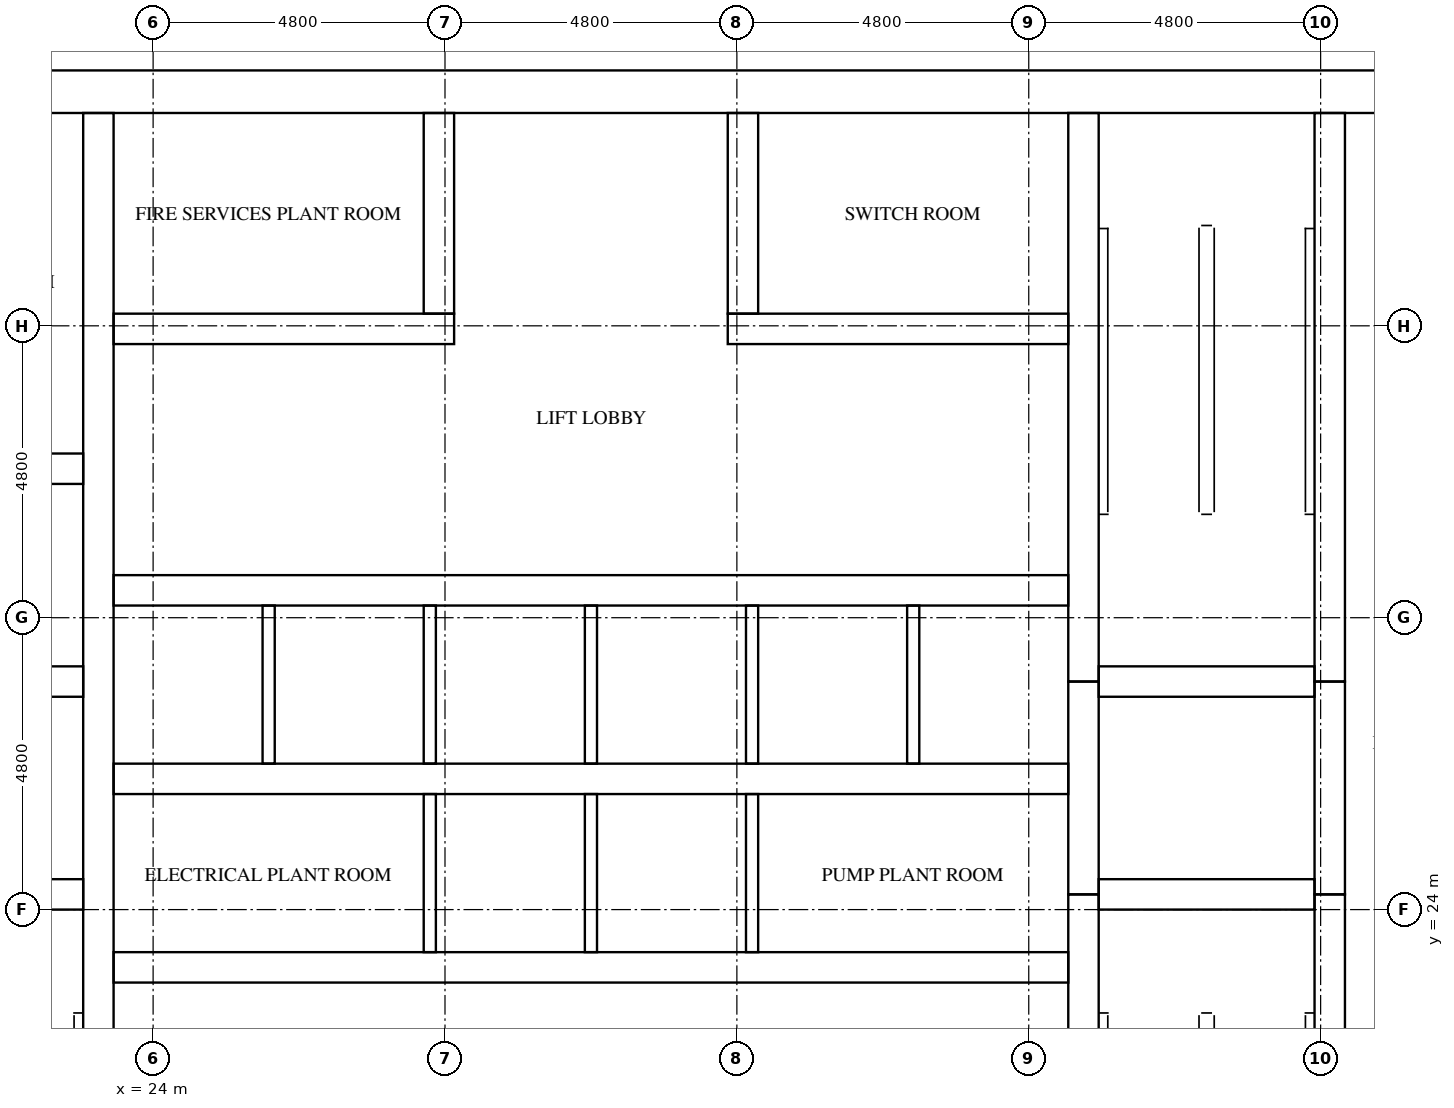
"""IFC4 building model, lengths in metres.
Left out: names, types, materials, properties, quantities, classifications, styles, units other than length and angle.
Written with IfcOpenShell. Run it as: python <this file> out.ifc"""

import sys

from ifc_helpers import new_model, si_unit, direction, frame, frame_2d, origin, place, context, subcontext, project, spatial, rectangle, extrude, element, fill, save


model = new_model("IFC4")
c1 = context("Model", 3, precision=1e-05, world=origin(), true_north=direction((0.0, 1.0)))
c2 = subcontext(c1, "Body", "Model", "MODEL_VIEW")
j1 = project(units=[si_unit("LENGTHUNIT", "METRE"), si_unit("PLANEANGLEUNIT", "RADIAN")], contexts=[c1])
p1 = place(None, origin())
s1 = spatial("IfcSite", under=j1, at=p1, CompositionType="ELEMENT")
p2 = place(p1, origin())
s2 = spatial("IfcBuilding", under=s1, at=p2, CompositionType="ELEMENT")
p3 = place(p2, frame((0.0, 0.0, 173.5)))
s3 = spatial("IfcBuildingStorey", under=s2, at=p3, CompositionType="ELEMENT", Elevation=173.5)
p4 = place(p3, frame((15.0, 37.45, 0.0), z_axis=(0.0, 0.0, 1.0), x_axis=(1.0, 0.0, 0.0)))
e1 = element("IfcWall", 1, at=p4, inside=s3, PredefinedType="SHEAR", context=c2, shape_type="SweptSolid", body=[
    extrude(rectangle(XDim=32.4, YDim=0.7, at=frame_2d((16.2, 0.0))), origin(), (0.0, 0.0, 1.0), 5.1),
])
p5 = place(p4, frame((15.3, 0.0, 0.0)))
e2 = element("IfcOpeningElement", 2, at=p5, cuts=e1, PredefinedType="OPENING", context=c2, shape_type="SweptSolid", body=[
    extrude(rectangle(XDim=1.8, YDim=2.1, at=frame_2d((0.9, 1.05))), frame((0.0, 0.36, 0.0), z_axis=(0.0, -1.0, 0.0), x_axis=(1.0, 0.0, 0.0)), (0.0, 0.0, 1.0), 0.72),
])
p6 = place(p4, frame((1.544, 0.0, 0.0)))
e3 = element("IfcOpeningElement", 3, at=p6, cuts=e1, PredefinedType="OPENING", context=c2, shape_type="SweptSolid", body=[
    extrude(rectangle(XDim=1.0, YDim=2.1, at=frame_2d((0.5, 1.05))), frame((0.0, 0.36, 0.0), z_axis=(0.0, -1.0, 0.0), x_axis=(1.0, 0.0, 0.0)), (0.0, 0.0, 1.0), 0.72),
])
p7 = place(p4, frame((5.219, 0.0, 0.0)))
e4 = element("IfcOpeningElement", 4, at=p7, cuts=e1, PredefinedType="OPENING", context=c2, shape_type="SweptSolid", body=[
    extrude(rectangle(XDim=1.0, YDim=2.1, at=frame_2d((0.5, 1.05))), frame((0.0, 0.36, 0.0), z_axis=(0.0, -1.0, 0.0), x_axis=(1.0, 0.0, 0.0)), (0.0, 0.0, 1.0), 0.72),
])
p8 = place(p3, frame((23.1, 15.7, 0.0), z_axis=(0.0, 0.0, 1.0), x_axis=(0.0, 1.0, 0.0)))
e5 = element("IfcWall", 5, at=p8, inside=s3, PredefinedType="SHEAR", context=c2, shape_type="SweptSolid", body=[
    extrude(rectangle(XDim=21.4, YDim=0.5, at=frame_2d((10.7, 0.0))), origin(), (0.0, 0.0, 1.0), 5.1),
])
p9 = place(p3, frame((39.3, 15.7, 0.0), z_axis=(0.0, 0.0, 1.0), x_axis=(0.0, 1.0, 0.0)))
e6 = element("IfcWall", 6, at=p9, inside=s3, PredefinedType="SHEAR", context=c2, shape_type="SweptSolid", body=[
    extrude(rectangle(XDim=8.55, YDim=0.5, at=frame_2d((4.275, 0.0))), origin(), (0.0, 0.0, 1.0), 5.1),
])
p10 = place(p3, frame((39.3, 24.25, 0.0), z_axis=(0.0, 0.0, 1.0), x_axis=(0.0, 1.0, 0.0)))
e7 = element("IfcWall", 7, at=p10, inside=s3, PredefinedType="SHEAR", context=c2, shape_type="SweptSolid", body=[
    extrude(rectangle(XDim=3.5, YDim=0.5, at=frame_2d((1.75, 0.0))), origin(), (0.0, 0.0, 1.0), 5.1),
])
p11 = place(p3, frame((39.3, 27.75, 0.0), z_axis=(0.0, 0.0, 1.0), x_axis=(0.0, 1.0, 0.0)))
e8 = element("IfcWall", 8, at=p11, inside=s3, PredefinedType="SHEAR", context=c2, shape_type="SweptSolid", body=[
    extrude(rectangle(XDim=9.35, YDim=0.5, at=frame_2d((4.675, 0.0))), origin(), (0.0, 0.0, 1.0), 5.1),
])
p12 = place(p3, frame((43.35, 15.7, 0.0), z_axis=(0.0, 0.0, 1.0), x_axis=(0.0, 1.0, 0.0)))
e9 = element("IfcWall", 9, at=p12, inside=s3, PredefinedType="SHEAR", context=c2, shape_type="SweptSolid", body=[
    extrude(rectangle(XDim=8.55, YDim=0.5, at=frame_2d((4.275, 0.0))), origin(), (0.0, 0.0, 1.0), 5.1),
])
p13 = place(p12, frame((0.5, 0.0, 0.0)))
e10 = element("IfcOpeningElement", 10, at=p13, cuts=e9, PredefinedType="OPENING", context=c2, shape_type="SweptSolid", body=[
    extrude(rectangle(XDim=1.2, YDim=2.1, at=frame_2d((0.6, 1.05))), frame((0.0, 0.26, 0.0), z_axis=(0.0, -1.0, 0.0), x_axis=(1.0, 0.0, 0.0)), (0.0, 0.0, 1.0), 0.52),
])
p14 = place(p3, frame((43.35, 24.25, 0.0), z_axis=(0.0, 0.0, 1.0), x_axis=(0.0, 1.0, 0.0)))
e11 = element("IfcWall", 11, at=p14, inside=s3, PredefinedType="SHEAR", context=c2, shape_type="SweptSolid", body=[
    extrude(rectangle(XDim=3.5, YDim=0.5, at=frame_2d((1.75, 0.0))), origin(), (0.0, 0.0, 1.0), 5.1),
])
p15 = place(p14, frame((1.2, 0.0, 0.0)))
e12 = element("IfcOpeningElement", 12, at=p15, cuts=e11, PredefinedType="OPENING", context=c2, shape_type="SweptSolid", body=[
    extrude(rectangle(XDim=1.1, YDim=2.1, at=frame_2d((0.55, 1.05))), frame((0.0, 0.26, 0.0), z_axis=(0.0, -1.0, 0.0), x_axis=(1.0, 0.0, 0.0)), (0.0, 0.0, 1.0), 0.52),
])
p16 = place(p3, frame((43.35, 27.75, 0.0), z_axis=(0.0, 0.0, 1.0), x_axis=(0.0, 1.0, 0.0)))
e13 = element("IfcWall", 13, at=p16, inside=s3, PredefinedType="SHEAR", context=c2, shape_type="SweptSolid", body=[
    extrude(rectangle(XDim=9.35, YDim=0.5, at=frame_2d((4.675, 0.0))), origin(), (0.0, 0.0, 1.0), 5.1),
])
p17 = place(p16, frame((7.65, 0.0, 0.0)))
e14 = element("IfcOpeningElement", 14, at=p17, cuts=e13, PredefinedType="OPENING", context=c2, shape_type="SweptSolid", body=[
    extrude(rectangle(XDim=1.2, YDim=2.1, at=frame_2d((0.6, 1.05))), frame((0.0, 0.26, 0.0), z_axis=(0.0, -1.0, 0.0), x_axis=(1.0, 0.0, 0.0)), (0.0, 0.0, 1.0), 0.52),
])
for number, where, z_axis, x_axis in (
    (15, (19.3, 24.25, 0.0), (0.0, 0.0, 1.0), (1.0, 0.0, 0.0)),
    (16, (19.3, 27.75, 0.0), (0.0, 0.0, 1.0), (1.0, 0.0, 0.0)),
):
    element("IfcWall", number, at=place(p3, frame(where, z_axis=z_axis, x_axis=x_axis)), inside=s3, PredefinedType="SHEAR", context=c2, shape_type="SweptSolid", body=[
        extrude(rectangle(XDim=3.55, YDim=0.5, at=frame_2d((1.775, 0.0))), origin(), (0.0, 0.0, 1.0), 5.1),
    ])
p18 = place(p3, frame((15.7, 31.25, 0.0), z_axis=(0.0, 0.0, 1.0), x_axis=(1.0, 0.0, 0.0)))
e17 = element("IfcWall", 17, at=p18, inside=s3, PredefinedType="SHEAR", context=c2, shape_type="SweptSolid", body=[
    extrude(rectangle(XDim=7.15, YDim=0.5, at=frame_2d((3.575, 0.0))), origin(), (0.0, 0.0, 1.0), 5.1),
])
for number, where, z_axis, x_axis in (
    (18, (39.55, 24.25, 0.0), (0.0, 0.0, 1.0), (1.0, 0.0, 0.0)),
    (19, (39.55, 27.75, 0.0), (0.0, 0.0, 1.0), (1.0, 0.0, 0.0)),
):
    element("IfcWall", number, at=place(p3, frame(where, z_axis=z_axis, x_axis=x_axis)), inside=s3, PredefinedType="SHEAR", context=c2, shape_type="SweptSolid", body=[
        extrude(rectangle(XDim=3.55, YDim=0.5, at=frame_2d((1.775, 0.0))), origin(), (0.0, 0.0, 1.0), 5.1),
    ])
p19 = place(p3, frame((23.35, 23.05, 0.0), z_axis=(0.0, 0.0, 1.0), x_axis=(1.0, 0.0, 0.0)))
e20 = element("IfcWall", 20, at=p19, inside=s3, PredefinedType="SHEAR", context=c2, shape_type="SweptSolid", body=[
    extrude(rectangle(XDim=15.7, YDim=0.5, at=frame_2d((7.85, 0.0))), origin(), (0.0, 0.0, 1.0), 5.1),
])
p20 = place(p19, frame((2.05, 0.0, 0.0)))
e21 = element("IfcOpeningElement", 21, at=p20, cuts=e20, PredefinedType="OPENING", context=c2, shape_type="SweptSolid", body=[
    extrude(rectangle(XDim=1.0, YDim=2.1, at=frame_2d((0.5, 1.05))), frame((0.0, 0.26, 0.0), z_axis=(0.0, -1.0, 0.0), x_axis=(1.0, 0.0, 0.0)), (0.0, 0.0, 1.0), 0.52),
])
p21 = place(p19, frame((12.65, 0.0, 0.0)))
e22 = element("IfcOpeningElement", 22, at=p21, cuts=e20, PredefinedType="OPENING", context=c2, shape_type="SweptSolid", body=[
    extrude(rectangle(XDim=1.0, YDim=2.1, at=frame_2d((0.5, 1.05))), frame((0.0, 0.26, 0.0), z_axis=(0.0, -1.0, 0.0), x_axis=(1.0, 0.0, 0.0)), (0.0, 0.0, 1.0), 0.52),
])
p22 = place(p3, frame((23.35, 26.15, 0.0), z_axis=(0.0, 0.0, 1.0), x_axis=(1.0, 0.0, 0.0)))
e23 = element("IfcWall", 23, at=p22, inside=s3, PredefinedType="SHEAR", context=c2, shape_type="SweptSolid", body=[
    extrude(rectangle(XDim=15.7, YDim=0.5, at=frame_2d((7.85, 0.0))), origin(), (0.0, 0.0, 1.0), 5.1),
])
p23 = place(p3, frame((23.35, 29.25, 0.0), z_axis=(0.0, 0.0, 1.0), x_axis=(1.0, 0.0, 0.0)))
e24 = element("IfcWall", 24, at=p23, inside=s3, PredefinedType="SHEAR", context=c2, shape_type="SweptSolid", body=[
    extrude(rectangle(XDim=15.7, YDim=0.5, at=frame_2d((7.85, 0.0))), origin(), (0.0, 0.0, 1.0), 5.1),
])
p24 = place(p23, frame((0.675, 0.0, 0.0)))
e25 = element("IfcOpeningElement", 25, at=p24, cuts=e24, PredefinedType="OPENING", context=c2, shape_type="SweptSolid", body=[
    extrude(rectangle(XDim=1.1, YDim=2.1, at=frame_2d((0.55, 1.05))), frame((0.0, 0.26, 0.0), z_axis=(0.0, -1.0, 0.0), x_axis=(1.0, 0.0, 0.0)), (0.0, 0.0, 1.0), 0.52),
])
p25 = place(p23, frame((3.325, 0.0, 0.0)))
e26 = element("IfcOpeningElement", 26, at=p25, cuts=e24, PredefinedType="OPENING", context=c2, shape_type="SweptSolid", body=[
    extrude(rectangle(XDim=1.1, YDim=2.1, at=frame_2d((0.55, 1.05))), frame((0.0, 0.26, 0.0), z_axis=(0.0, -1.0, 0.0), x_axis=(1.0, 0.0, 0.0)), (0.0, 0.0, 1.0), 0.52),
])
p26 = place(p23, frame((5.975, 0.0, 0.0)))
e27 = element("IfcOpeningElement", 27, at=p26, cuts=e24, PredefinedType="OPENING", context=c2, shape_type="SweptSolid", body=[
    extrude(rectangle(XDim=1.1, YDim=2.1, at=frame_2d((0.55, 1.05))), frame((0.0, 0.26, 0.0), z_axis=(0.0, -1.0, 0.0), x_axis=(1.0, 0.0, 0.0)), (0.0, 0.0, 1.0), 0.52),
])
p27 = place(p23, frame((8.625, 0.0, 0.0)))
e28 = element("IfcOpeningElement", 28, at=p27, cuts=e24, PredefinedType="OPENING", context=c2, shape_type="SweptSolid", body=[
    extrude(rectangle(XDim=1.1, YDim=2.1, at=frame_2d((0.55, 1.05))), frame((0.0, 0.26, 0.0), z_axis=(0.0, -1.0, 0.0), x_axis=(1.0, 0.0, 0.0)), (0.0, 0.0, 1.0), 0.52),
])
p28 = place(p23, frame((11.275, 0.0, 0.0)))
e29 = element("IfcOpeningElement", 29, at=p28, cuts=e24, PredefinedType="OPENING", context=c2, shape_type="SweptSolid", body=[
    extrude(rectangle(XDim=1.1, YDim=2.1, at=frame_2d((0.55, 1.05))), frame((0.0, 0.26, 0.0), z_axis=(0.0, -1.0, 0.0), x_axis=(1.0, 0.0, 0.0)), (0.0, 0.0, 1.0), 0.52),
])
p29 = place(p23, frame((13.925, 0.0, 0.0)))
e30 = element("IfcOpeningElement", 30, at=p29, cuts=e24, PredefinedType="OPENING", context=c2, shape_type="SweptSolid", body=[
    extrude(rectangle(XDim=1.1, YDim=2.1, at=frame_2d((0.55, 1.05))), frame((0.0, 0.26, 0.0), z_axis=(0.0, -1.0, 0.0), x_axis=(1.0, 0.0, 0.0)), (0.0, 0.0, 1.0), 0.52),
])
p30 = place(p3, frame((23.35, 33.55, 0.0), z_axis=(0.0, 0.0, 1.0), x_axis=(1.0, 0.0, 0.0)))
e31 = element("IfcWall", 31, at=p30, inside=s3, PredefinedType="SHEAR", context=c2, shape_type="SweptSolid", body=[
    extrude(rectangle(XDim=5.6, YDim=0.5, at=frame_2d((2.8, 0.0))), origin(), (0.0, 0.0, 1.0), 5.1),
])
p31 = place(p30, frame((2.05, 0.0, 0.0)))
e32 = element("IfcOpeningElement", 32, at=p31, cuts=e31, PredefinedType="OPENING", context=c2, shape_type="SweptSolid", body=[
    extrude(rectangle(XDim=1.0, YDim=2.1, at=frame_2d((0.5, 1.05))), frame((0.0, 0.26, 0.0), z_axis=(0.0, -1.0, 0.0), x_axis=(1.0, 0.0, 0.0)), (0.0, 0.0, 1.0), 0.52),
])
p32 = place(p3, frame((33.45, 33.55, 0.0), z_axis=(0.0, 0.0, 1.0), x_axis=(1.0, 0.0, 0.0)))
e33 = element("IfcWall", 33, at=p32, inside=s3, PredefinedType="SHEAR", context=c2, shape_type="SweptSolid", body=[
    extrude(rectangle(XDim=5.6, YDim=0.5, at=frame_2d((2.8, 0.0))), origin(), (0.0, 0.0, 1.0), 5.1),
])
p33 = place(p32, frame((2.55, 0.0, 0.0)))
e34 = element("IfcOpeningElement", 34, at=p33, cuts=e33, PredefinedType="OPENING", context=c2, shape_type="SweptSolid", body=[
    extrude(rectangle(XDim=1.0, YDim=2.1, at=frame_2d((0.5, 1.05))), frame((0.0, 0.26, 0.0), z_axis=(0.0, -1.0, 0.0), x_axis=(1.0, 0.0, 0.0)), (0.0, 0.0, 1.0), 0.52),
])
for number, where, z_axis, x_axis in (
    (35, (28.7, 33.8, 0.0), (0.0, 0.0, 1.0), (0.0, 1.0, 0.0)),
    (36, (33.7, 33.8, 0.0), (0.0, 0.0, 1.0), (0.0, 1.0, 0.0)),
):
    element("IfcWall", number, at=place(p3, frame(where, z_axis=z_axis, x_axis=x_axis)), inside=s3, PredefinedType="SHEAR", context=c2, shape_type="SweptSolid", body=[
        extrude(rectangle(XDim=3.3, YDim=0.5, at=frame_2d((1.65, 0.0))), origin(), (0.0, 0.0, 1.0), 5.1),
    ])
p34 = place(p3, frame((25.9, 26.4, 0.0), z_axis=(0.0, 0.0, 1.0), x_axis=(0.0, 1.0, 0.0)))
e37 = element("IfcWall", 37, at=p34, inside=s3, PredefinedType="SOLIDWALL", context=c2, shape_type="SweptSolid", body=[
    extrude(rectangle(XDim=2.6, YDim=0.2, at=frame_2d((1.3, 0.0))), origin(), (0.0, 0.0, 1.0), 5.1),
])
p35 = place(p3, frame((28.55, 23.3, 0.0), z_axis=(0.0, 0.0, 1.0), x_axis=(0.0, 1.0, 0.0)))
e38 = element("IfcWall", 38, at=p35, inside=s3, PredefinedType="SOLIDWALL", context=c2, shape_type="SweptSolid", body=[
    extrude(rectangle(XDim=2.6, YDim=0.2, at=frame_2d((1.3, 0.0))), origin(), (0.0, 0.0, 1.0), 5.1),
])
p36 = place(p3, frame((28.55, 26.4, 0.0), z_axis=(0.0, 0.0, 1.0), x_axis=(0.0, 1.0, 0.0)))
e39 = element("IfcWall", 39, at=p36, inside=s3, PredefinedType="SOLIDWALL", context=c2, shape_type="SweptSolid", body=[
    extrude(rectangle(XDim=2.6, YDim=0.2, at=frame_2d((1.3, 0.0))), origin(), (0.0, 0.0, 1.0), 5.1),
])
p37 = place(p3, frame((31.2, 23.3, 0.0), z_axis=(0.0, 0.0, 1.0), x_axis=(0.0, 1.0, 0.0)))
e40 = element("IfcWall", 40, at=p37, inside=s3, PredefinedType="SOLIDWALL", context=c2, shape_type="SweptSolid", body=[
    extrude(rectangle(XDim=2.6, YDim=0.2, at=frame_2d((1.3, 0.0))), origin(), (0.0, 0.0, 1.0), 5.1),
])
p38 = place(p3, frame((31.2, 26.4, 0.0), z_axis=(0.0, 0.0, 1.0), x_axis=(0.0, 1.0, 0.0)))
e41 = element("IfcWall", 41, at=p38, inside=s3, PredefinedType="SOLIDWALL", context=c2, shape_type="SweptSolid", body=[
    extrude(rectangle(XDim=2.6, YDim=0.2, at=frame_2d((1.3, 0.0))), origin(), (0.0, 0.0, 1.0), 5.1),
])
p39 = place(p3, frame((33.85, 23.3, 0.0), z_axis=(0.0, 0.0, 1.0), x_axis=(0.0, 1.0, 0.0)))
e42 = element("IfcWall", 42, at=p39, inside=s3, PredefinedType="SOLIDWALL", context=c2, shape_type="SweptSolid", body=[
    extrude(rectangle(XDim=2.6, YDim=0.2, at=frame_2d((1.3, 0.0))), origin(), (0.0, 0.0, 1.0), 5.1),
])
for number, where, z_axis, x_axis in (
    (43, (33.85, 26.4, 0.0), (0.0, 0.0, 1.0), (0.0, 1.0, 0.0)),
    (44, (36.5, 26.4, 0.0), (0.0, 0.0, 1.0), (0.0, 1.0, 0.0)),
):
    element("IfcWall", number, at=place(p3, frame(where, z_axis=z_axis, x_axis=x_axis)), inside=s3, PredefinedType="SOLIDWALL", context=c2, shape_type="SweptSolid", body=[
        extrude(rectangle(XDim=2.6, YDim=0.2, at=frame_2d((1.3, 0.0))), origin(), (0.0, 0.0, 1.0), 5.1),
    ])
p40 = place(p24, origin())
e45 = element("IfcDoor", 45, at=p40, inside=s3, OperationType="DOUBLE_DOOR_SLIDING", PredefinedType="DOOR", context=c2, shape_type="SweptSolid", body=[
    extrude(rectangle(XDim=1.1, YDim=2.1, at=frame_2d((0.55, 1.05))), frame((0.0, 0.025, 0.0), z_axis=(0.0, -1.0, 0.0), x_axis=(1.0, 0.0, 0.0)), (0.0, 0.0, 1.0), 0.05),
])
fill(e25, e45)
p41 = place(p25, origin())
e46 = element("IfcDoor", 46, at=p41, inside=s3, OperationType="DOUBLE_DOOR_SLIDING", PredefinedType="DOOR", context=c2, shape_type="SweptSolid", body=[
    extrude(rectangle(XDim=1.1, YDim=2.1, at=frame_2d((0.55, 1.05))), frame((0.0, 0.025, 0.0), z_axis=(0.0, -1.0, 0.0), x_axis=(1.0, 0.0, 0.0)), (0.0, 0.0, 1.0), 0.05),
])
fill(e26, e46)
p42 = place(p26, origin())
e47 = element("IfcDoor", 47, at=p42, inside=s3, OperationType="DOUBLE_DOOR_SLIDING", PredefinedType="DOOR", context=c2, shape_type="SweptSolid", body=[
    extrude(rectangle(XDim=1.1, YDim=2.1, at=frame_2d((0.55, 1.05))), frame((0.0, 0.025, 0.0), z_axis=(0.0, -1.0, 0.0), x_axis=(1.0, 0.0, 0.0)), (0.0, 0.0, 1.0), 0.05),
])
fill(e27, e47)
p43 = place(p27, origin())
e48 = element("IfcDoor", 48, at=p43, inside=s3, OperationType="DOUBLE_DOOR_SLIDING", PredefinedType="DOOR", context=c2, shape_type="SweptSolid", body=[
    extrude(rectangle(XDim=1.1, YDim=2.1, at=frame_2d((0.55, 1.05))), frame((0.0, 0.025, 0.0), z_axis=(0.0, -1.0, 0.0), x_axis=(1.0, 0.0, 0.0)), (0.0, 0.0, 1.0), 0.05),
])
fill(e28, e48)
p44 = place(p28, origin())
e49 = element("IfcDoor", 49, at=p44, inside=s3, OperationType="DOUBLE_DOOR_SLIDING", PredefinedType="DOOR", context=c2, shape_type="SweptSolid", body=[
    extrude(rectangle(XDim=1.1, YDim=2.1, at=frame_2d((0.55, 1.05))), frame((0.0, 0.025, 0.0), z_axis=(0.0, -1.0, 0.0), x_axis=(1.0, 0.0, 0.0)), (0.0, 0.0, 1.0), 0.05),
])
fill(e29, e49)
p45 = place(p29, origin())
e50 = element("IfcDoor", 50, at=p45, inside=s3, OperationType="DOUBLE_DOOR_SLIDING", PredefinedType="DOOR", context=c2, shape_type="SweptSolid", body=[
    extrude(rectangle(XDim=1.1, YDim=2.1, at=frame_2d((0.55, 1.05))), frame((0.0, 0.025, 0.0), z_axis=(0.0, -1.0, 0.0), x_axis=(1.0, 0.0, 0.0)), (0.0, 0.0, 1.0), 0.05),
])
fill(e30, e50)
p46 = place(p15, origin())
e51 = element("IfcDoor", 51, at=p46, inside=s3, OperationType="DOUBLE_DOOR_SLIDING", PredefinedType="DOOR", context=c2, shape_type="SweptSolid", body=[
    extrude(rectangle(XDim=1.1, YDim=2.1, at=frame_2d((0.55, 1.05))), frame((0.0, 0.025, 0.0), z_axis=(0.0, -1.0, 0.0), x_axis=(1.0, 0.0, 0.0)), (0.0, 0.0, 1.0), 0.05),
])
fill(e12, e51)
p47 = place(p17, origin())
e52 = element("IfcDoor", 52, at=p47, inside=s3, OperationType="SINGLE_SWING_LEFT", PredefinedType="DOOR", context=c2, shape_type="SweptSolid", body=[
    extrude(rectangle(XDim=1.2, YDim=2.1, at=frame_2d((0.6, 1.05))), frame((0.0, 0.025, 0.0), z_axis=(0.0, -1.0, 0.0), x_axis=(1.0, 0.0, 0.0)), (0.0, 0.0, 1.0), 0.05),
])
fill(e14, e52)
p48 = place(p5, origin())
e53 = element("IfcDoor", 53, at=p48, inside=s3, OperationType="DOUBLE_DOOR_SINGLE_SWING", PredefinedType="DOOR", context=c2, shape_type="SweptSolid", body=[
    extrude(rectangle(XDim=1.8, YDim=2.1, at=frame_2d((0.9, 1.05))), frame((0.0, 0.025, 0.0), z_axis=(0.0, -1.0, 0.0), x_axis=(1.0, 0.0, 0.0)), (0.0, 0.0, 1.0), 0.05),
])
fill(e2, e53)
p49 = place(p20, frame((1.0, 0.0, 0.0), z_axis=(0.0, 0.0, 1.0), x_axis=(-1.0, 0.0, 0.0)))
e54 = element("IfcDoor", 54, at=p49, inside=s3, OperationType="SINGLE_SWING_RIGHT", PredefinedType="DOOR", context=c2, shape_type="SweptSolid", body=[
    extrude(rectangle(XDim=1.0, YDim=2.1, at=frame_2d((0.5, 1.05))), frame((0.0, 0.025, 0.0), z_axis=(0.0, -1.0, 0.0), x_axis=(1.0, 0.0, 0.0)), (0.0, 0.0, 1.0), 0.05),
])
fill(e21, e54)
p50 = place(p21, frame((1.0, 0.0, 0.0), z_axis=(0.0, 0.0, 1.0), x_axis=(-1.0, 0.0, 0.0)))
e55 = element("IfcDoor", 55, at=p50, inside=s3, OperationType="SINGLE_SWING_LEFT", PredefinedType="DOOR", context=c2, shape_type="SweptSolid", body=[
    extrude(rectangle(XDim=1.0, YDim=2.1, at=frame_2d((0.5, 1.05))), frame((0.0, 0.025, 0.0), z_axis=(0.0, -1.0, 0.0), x_axis=(1.0, 0.0, 0.0)), (0.0, 0.0, 1.0), 0.05),
])
fill(e22, e55)
p51 = place(p31, frame((1.0, 0.0, 0.0), z_axis=(0.0, 0.0, 1.0), x_axis=(-1.0, 0.0, 0.0)))
e56 = element("IfcDoor", 56, at=p51, inside=s3, OperationType="SINGLE_SWING_RIGHT", PredefinedType="DOOR", context=c2, shape_type="SweptSolid", body=[
    extrude(rectangle(XDim=1.0, YDim=2.1, at=frame_2d((0.5, 1.05))), frame((0.0, 0.025, 0.0), z_axis=(0.0, -1.0, 0.0), x_axis=(1.0, 0.0, 0.0)), (0.0, 0.0, 1.0), 0.05),
])
fill(e32, e56)
p52 = place(p33, frame((1.0, 0.0, 0.0), z_axis=(0.0, 0.0, 1.0), x_axis=(-1.0, 0.0, 0.0)))
e57 = element("IfcDoor", 57, at=p52, inside=s3, OperationType="SINGLE_SWING_LEFT", PredefinedType="DOOR", context=c2, shape_type="SweptSolid", body=[
    extrude(rectangle(XDim=1.0, YDim=2.1, at=frame_2d((0.5, 1.05))), frame((0.0, 0.025, 0.0), z_axis=(0.0, -1.0, 0.0), x_axis=(1.0, 0.0, 0.0)), (0.0, 0.0, 1.0), 0.05),
])
fill(e34, e57)
save(model, sys.argv[1])
